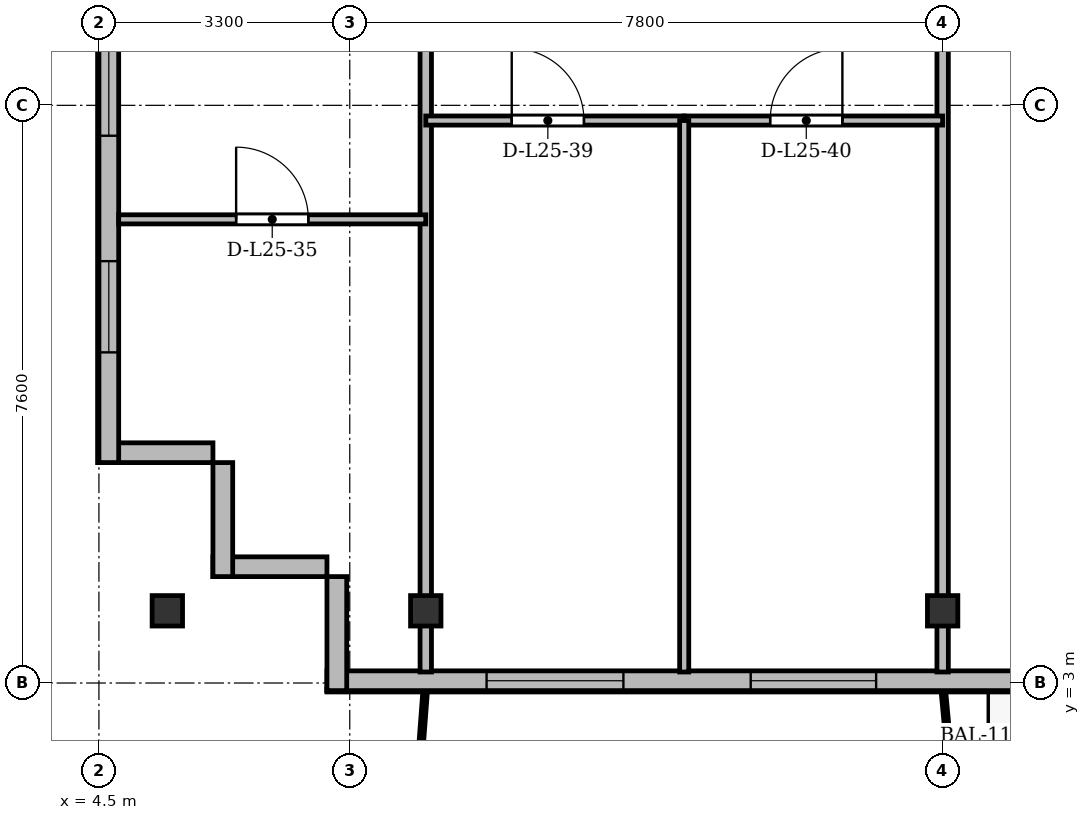
"""IFC4 building model, lengths in metres.
Left out: names, types, materials, properties, quantities, classifications, styles, units other than length and angle.
Written with IfcOpenShell. Run it as: python <this file> out.ifc"""

import sys

from ifc_helpers import new_model, si_unit, direction, frame, frame_2d, origin, origin_2d, place, context, subcontext, project, spatial, rectangle, i_section, extrude, source, transform, mapped, element, fill, save


model = new_model("IFC4")
c1 = context("Model", 3, precision=1e-05, world=origin(), true_north=direction((0.0, 1.0)))
c2 = subcontext(c1, "Body", "Model", "MODEL_VIEW")
j1 = project(units=[si_unit("LENGTHUNIT", "METRE"), si_unit("PLANEANGLEUNIT", "RADIAN")], contexts=[c1])
p1 = place(None, origin())
s1 = spatial("IfcSite", under=j1, at=p1, CompositionType="ELEMENT")
p2 = place(p1, origin())
s2 = spatial("IfcBuilding", under=s1, at=p2, CompositionType="ELEMENT")
p3 = place(p2, frame((0.0, 0.0, 99.7)))
s3 = spatial("IfcBuildingStorey", under=s2, at=p3, CompositionType="ELEMENT", Elevation=99.7)
m1 = source(origin(), c2, "Body", "SweptSolid", [
    extrude(i_section(OverallWidth=0.4, OverallDepth=0.4, WebThickness=0.022, FlangeThickness=0.035, at=origin_2d()), origin(), (0.0, 0.0, 1.0), 3.6),
])
for number, where, z_axis, x_axis in (
    (1, (5.4, 3.95, 0.0), (0.0, 0.0, 1.0), (1.0, 0.0, 0.0)),
    (2, (8.8, 3.95, 0.0), (0.0, 0.0, 1.0), (1.0, 0.0, 0.0)),
    (3, (15.6, 3.95, 0.0), (0.0, 0.0, 1.0), (1.0, 0.0, 0.0)),
):
    element("IfcColumn", number, at=place(p3, frame(where, z_axis=z_axis, x_axis=x_axis)), inside=s3, PredefinedType="COLUMN", context=c2, shape_type="MappedRepresentation", body=[
        mapped(m1, transform((0.0, 0.0, 0.0), x_axis=(1.0, 0.0, 0.0), y_axis=(0.0, 1.0, 0.0), z_axis=(0.0, 0.0, 1.0), scale=1.0)),
    ])
for number, where, z_axis, x_axis in (
    (4, (7.5, 4.53, 0.0), (0.0, 0.0, 1.0), (-1.0, 0.0, 0.0)),
    (5, (6.13, 4.4, 0.0), (0.0, 0.0, 1.0), (0.0, 1.0, 0.0)),
):
    element("IfcWall", number, at=place(p3, frame(where, z_axis=z_axis, x_axis=x_axis)), inside=s3, PredefinedType="SOLIDWALL", context=c2, shape_type="SweptSolid", body=[
        extrude(rectangle(XDim=1.5, YDim=0.26, at=frame_2d((0.75, 0.0))), origin(), (0.0, 0.0, 1.0), 3.34),
    ])
p4 = place(p3, frame((6.0, 6.03, 0.0), z_axis=(0.0, 0.0, 1.0), x_axis=(-1.0, 0.0, 0.0)))
e6 = element("IfcWall", 6, at=p4, inside=s3, PredefinedType="SOLIDWALL", context=c2, shape_type="SweptSolid", body=[
    extrude(rectangle(XDim=1.5, YDim=0.26, at=frame_2d((0.75, 0.0))), origin(), (0.0, 0.0, 1.0), 2.84),
])
p5 = place(p3, frame((4.63, 5.9, 0.0), z_axis=(0.0, 0.0, 1.0), x_axis=(0.0, 1.0, 0.0)))
e7 = element("IfcWall", 7, at=p5, inside=s3, PredefinedType="SOLIDWALL", context=c2, shape_type="SweptSolid", body=[
    extrude(rectangle(XDim=39.6, YDim=0.26, at=frame_2d((19.8, 0.0))), origin(), (0.0, 0.0, 1.0), 3.34),
])
p6 = place(p5, frame((1.45, 0.0, 0.92)))
e8 = element("IfcOpeningElement", 8, at=p6, cuts=e7, PredefinedType="OPENING", context=c2, shape_type="SweptSolid", body=[
    extrude(rectangle(XDim=1.2, YDim=1.65, at=frame_2d((0.6, 0.825))), frame((0.0, 0.14, 0.0), z_axis=(0.0, -1.0, 0.0), x_axis=(1.0, 0.0, 0.0)), (0.0, 0.0, 1.0), 0.28),
])
p7 = place(p5, frame((4.3, 0.0, 0.92)))
e9 = element("IfcOpeningElement", 9, at=p7, cuts=e7, PredefinedType="OPENING", context=c2, shape_type="SweptSolid", body=[
    extrude(rectangle(XDim=2.4, YDim=2.1, at=frame_2d((1.2, 1.05))), frame((0.0, 0.14, 0.0), z_axis=(0.0, -1.0, 0.0), x_axis=(1.0, 0.0, 0.0)), (0.0, 0.0, 1.0), 0.28),
])
p8 = place(p5, frame((8.5, 0.0, 0.92)))
e10 = element("IfcOpeningElement", 10, at=p8, cuts=e7, PredefinedType="OPENING", context=c2, shape_type="SweptSolid", body=[
    extrude(rectangle(XDim=2.4, YDim=2.1, at=frame_2d((1.2, 1.05))), frame((0.0, 0.14, 0.0), z_axis=(0.0, -1.0, 0.0), x_axis=(1.0, 0.0, 0.0)), (0.0, 0.0, 1.0), 0.28),
])
p9 = place(p5, frame((33.9, 0.0, 0.92)))
e11 = element("IfcOpeningElement", 11, at=p9, cuts=e7, PredefinedType="OPENING", context=c2, shape_type="SweptSolid", body=[
    extrude(rectangle(XDim=1.2, YDim=1.65, at=frame_2d((0.6, 0.825))), frame((0.0, 0.14, 0.0), z_axis=(0.0, -1.0, 0.0), x_axis=(1.0, 0.0, 0.0)), (0.0, 0.0, 1.0), 0.28),
])
p10 = place(p5, frame((37.25, 0.0, 0.92)))
e12 = element("IfcOpeningElement", 12, at=p10, cuts=e7, PredefinedType="OPENING", context=c2, shape_type="SweptSolid", body=[
    extrude(rectangle(XDim=1.2, YDim=1.65, at=frame_2d((0.6, 0.825))), frame((0.0, 0.14, 0.0), z_axis=(0.0, -1.0, 0.0), x_axis=(1.0, 0.0, 0.0)), (0.0, 0.0, 1.0), 0.28),
])
p11 = place(p3, frame((66.9, 3.03, 0.0), z_axis=(0.0, 0.0, 1.0), x_axis=(-1.0, 0.0, 0.0)))
e13 = element("IfcWall", 13, at=p11, inside=s3, PredefinedType="SOLIDWALL", context=c2, shape_type="SweptSolid", body=[
    extrude(rectangle(XDim=59.4, YDim=0.26, at=frame_2d((29.7, 0.0))), origin(), (0.0, 0.0, 1.0), 3.34),
])
p12 = place(p11, frame((1.9, 0.0, 0.9)))
e14 = element("IfcOpeningElement", 14, at=p12, cuts=e13, PredefinedType="OPENING", context=c2, shape_type="SweptSolid", body=[
    extrude(rectangle(XDim=2.2, YDim=1.8, at=frame_2d((1.1, 0.9))), frame((0.0, 0.14, 0.0), z_axis=(0.0, -1.0, 0.0), x_axis=(1.0, 0.0, 0.0)), (0.0, 0.0, 1.0), 0.28),
])
p13 = place(p11, frame((5.65, 0.0, 0.9)))
e15 = element("IfcOpeningElement", 15, at=p13, cuts=e13, PredefinedType="OPENING", context=c2, shape_type="SweptSolid", body=[
    extrude(rectangle(XDim=1.5, YDim=1.75, at=frame_2d((0.75, 0.875))), frame((0.0, 0.14, 0.0), z_axis=(0.0, -1.0, 0.0), x_axis=(1.0, 0.0, 0.0)), (0.0, 0.0, 1.0), 0.28),
])
p14 = place(p11, frame((8.4, 0.0, 0.9)))
e16 = element("IfcOpeningElement", 16, at=p14, cuts=e13, PredefinedType="OPENING", context=c2, shape_type="SweptSolid", body=[
    extrude(rectangle(XDim=2.0, YDim=1.95, at=frame_2d((1.0, 0.975))), frame((0.0, 0.14, 0.0), z_axis=(0.0, -1.0, 0.0), x_axis=(1.0, 0.0, 0.0)), (0.0, 0.0, 1.0), 0.28),
])
p15 = place(p11, frame((11.175, 0.0, 0.9)))
e17 = element("IfcOpeningElement", 17, at=p15, cuts=e13, PredefinedType="OPENING", context=c2, shape_type="SweptSolid", body=[
    extrude(rectangle(XDim=1.65, YDim=1.85, at=frame_2d((0.825, 0.925))), frame((0.0, 0.14, 0.0), z_axis=(0.0, -1.0, 0.0), x_axis=(1.0, 0.0, 0.0)), (0.0, 0.0, 1.0), 0.28),
])
p16 = place(p11, frame((13.7, 0.0, 0.9)))
e18 = element("IfcOpeningElement", 18, at=p16, cuts=e13, PredefinedType="OPENING", context=c2, shape_type="SweptSolid", body=[
    extrude(rectangle(XDim=1.8, YDim=1.8, at=frame_2d((0.9, 0.9))), frame((0.0, 0.14, 0.0), z_axis=(0.0, -1.0, 0.0), x_axis=(1.0, 0.0, 0.0)), (0.0, 0.0, 1.0), 0.28),
])
p17 = place(p11, frame((16.5, 0.0, 0.9)))
e19 = element("IfcOpeningElement", 19, at=p17, cuts=e13, PredefinedType="OPENING", context=c2, shape_type="SweptSolid", body=[
    extrude(rectangle(XDim=2.2, YDim=1.8, at=frame_2d((1.1, 0.9))), frame((0.0, 0.14, 0.0), z_axis=(0.0, -1.0, 0.0), x_axis=(1.0, 0.0, 0.0)), (0.0, 0.0, 1.0), 0.28),
])
p18 = place(p11, frame((20.227, 0.0, 0.0)))
e20 = element("IfcOpeningElement", 20, at=p18, cuts=e13, PredefinedType="OPENING", context=c2, shape_type="SweptSolid", body=[
    extrude(rectangle(XDim=1.2, YDim=2.2, at=frame_2d((0.6, 1.1))), frame((0.0, 0.14, 0.0), z_axis=(0.0, -1.0, 0.0), x_axis=(1.0, 0.0, 0.0)), (0.0, 0.0, 1.0), 0.28),
])
p19 = place(p11, frame((28.7, 0.0, 0.9)))
e21 = element("IfcOpeningElement", 21, at=p19, cuts=e13, PredefinedType="OPENING", context=c2, shape_type="SweptSolid", body=[
    extrude(rectangle(XDim=2.0, YDim=1.95, at=frame_2d((1.0, 0.975))), frame((0.0, 0.14, 0.0), z_axis=(0.0, -1.0, 0.0), x_axis=(1.0, 0.0, 0.0)), (0.0, 0.0, 1.0), 0.28),
])
p20 = place(p11, frame((36.675, 0.0, 0.9)))
e22 = element("IfcOpeningElement", 22, at=p20, cuts=e13, PredefinedType="OPENING", context=c2, shape_type="SweptSolid", body=[
    extrude(rectangle(XDim=1.65, YDim=1.85, at=frame_2d((0.825, 0.925))), frame((0.0, 0.14, 0.0), z_axis=(0.0, -1.0, 0.0), x_axis=(1.0, 0.0, 0.0)), (0.0, 0.0, 1.0), 0.28),
])
p21 = place(p11, frame((39.0, 0.0, 0.9)))
e23 = element("IfcOpeningElement", 23, at=p21, cuts=e13, PredefinedType="OPENING", context=c2, shape_type="SweptSolid", body=[
    extrude(rectangle(XDim=1.8, YDim=1.8, at=frame_2d((0.9, 0.9))), frame((0.0, 0.14, 0.0), z_axis=(0.0, -1.0, 0.0), x_axis=(1.0, 0.0, 0.0)), (0.0, 0.0, 1.0), 0.28),
])
p22 = place(p11, frame((41.55, 0.0, 0.9)))
e24 = element("IfcOpeningElement", 24, at=p22, cuts=e13, PredefinedType="OPENING", context=c2, shape_type="SweptSolid", body=[
    extrude(rectangle(XDim=1.5, YDim=1.75, at=frame_2d((0.75, 0.875))), frame((0.0, 0.14, 0.0), z_axis=(0.0, -1.0, 0.0), x_axis=(1.0, 0.0, 0.0)), (0.0, 0.0, 1.0), 0.28),
])
p23 = place(p11, frame((45.36, 0.0, 0.0)))
e25 = element("IfcOpeningElement", 25, at=p23, cuts=e13, PredefinedType="OPENING", context=c2, shape_type="SweptSolid", body=[
    extrude(rectangle(XDim=1.2, YDim=2.2, at=frame_2d((0.6, 1.1))), frame((0.0, 0.14, 0.0), z_axis=(0.0, -1.0, 0.0), x_axis=(1.0, 0.0, 0.0)), (0.0, 0.0, 1.0), 0.28),
])
p24 = place(p11, frame((48.3, 0.0, 0.9)))
e26 = element("IfcOpeningElement", 26, at=p24, cuts=e13, PredefinedType="OPENING", context=c2, shape_type="SweptSolid", body=[
    extrude(rectangle(XDim=2.0, YDim=1.95, at=frame_2d((1.0, 0.975))), frame((0.0, 0.14, 0.0), z_axis=(0.0, -1.0, 0.0), x_axis=(1.0, 0.0, 0.0)), (0.0, 0.0, 1.0), 0.28),
])
p25 = place(p11, frame((52.175, 0.0, 0.9)))
e27 = element("IfcOpeningElement", 27, at=p25, cuts=e13, PredefinedType="OPENING", context=c2, shape_type="SweptSolid", body=[
    extrude(rectangle(XDim=1.65, YDim=1.85, at=frame_2d((0.825, 0.925))), frame((0.0, 0.14, 0.0), z_axis=(0.0, -1.0, 0.0), x_axis=(1.0, 0.0, 0.0)), (0.0, 0.0, 1.0), 0.28),
])
p26 = place(p11, frame((55.5, 0.0, 0.9)))
e28 = element("IfcOpeningElement", 28, at=p26, cuts=e13, PredefinedType="OPENING", context=c2, shape_type="SweptSolid", body=[
    extrude(rectangle(XDim=1.8, YDim=1.8, at=frame_2d((0.9, 0.9))), frame((0.0, 0.14, 0.0), z_axis=(0.0, -1.0, 0.0), x_axis=(1.0, 0.0, 0.0)), (0.0, 0.0, 1.0), 0.28),
])
p27 = place(p3, frame((7.63, 2.9, 0.0), z_axis=(0.0, 0.0, 1.0), x_axis=(0.0, 1.0, 0.0)))
e29 = element("IfcWall", 29, at=p27, inside=s3, PredefinedType="SOLIDWALL", context=c2, shape_type="SweptSolid", body=[
    extrude(rectangle(XDim=1.5, YDim=0.26, at=frame_2d((0.75, 0.0))), origin(), (0.0, 0.0, 1.0), 2.752),
])
for number, where, z_axis, x_axis in (
    (30, (8.8, 3.145, 0.0), (0.0, 0.0, 1.0), (0.0, 1.0, 0.0)),
    (31, (15.6, 3.145, 0.0), (0.0, 0.0, 1.0), (0.0, 1.0, 0.0)),
):
    element("IfcWall", number, at=place(p3, frame(where, z_axis=z_axis, x_axis=x_axis)), inside=s3, PredefinedType="PARTITIONING", context=c2, shape_type="SweptSolid", body=[
        extrude(rectangle(XDim=24.455, YDim=0.15, at=frame_2d((12.228, 0.0))), origin(), (0.0, 0.0, 1.0), 2.84),
    ])
p28 = place(p3, frame((4.76, 9.1, 0.0), z_axis=(0.0, 0.0, 1.0), x_axis=(1.0, 0.0, 0.0)))
e32 = element("IfcWall", 32, at=p28, inside=s3, PredefinedType="PARTITIONING", context=c2, shape_type="SweptSolid", body=[
    extrude(rectangle(XDim=4.04, YDim=0.12, at=frame_2d((2.02, 0.0))), origin(), (0.0, 0.0, 1.0), 2.84),
])
p29 = place(p28, frame((1.545, 0.0, 0.0)))
e33 = element("IfcOpeningElement", 33, at=p29, cuts=e32, PredefinedType="OPENING", context=c2, shape_type="SweptSolid", body=[
    extrude(rectangle(XDim=0.95, YDim=2.15, at=frame_2d((0.475, 1.075))), frame((0.0, 0.07, 0.0), z_axis=(0.0, -1.0, 0.0), x_axis=(1.0, 0.0, 0.0)), (0.0, 0.0, 1.0), 0.14),
])
p30 = place(p3, frame((8.8, 10.4, 0.0), z_axis=(0.0, 0.0, 1.0), x_axis=(1.0, 0.0, 0.0)))
e34 = element("IfcWall", 34, at=p30, inside=s3, PredefinedType="PARTITIONING", context=c2, shape_type="SweptSolid", body=[
    extrude(rectangle(XDim=3.4, YDim=0.12, at=frame_2d((1.7, 0.0))), origin(), (0.0, 0.0, 1.0), 2.84),
])
p31 = place(p30, frame((1.131, 0.0, 0.0)))
e35 = element("IfcOpeningElement", 35, at=p31, cuts=e34, PredefinedType="OPENING", context=c2, shape_type="SweptSolid", body=[
    extrude(rectangle(XDim=0.95, YDim=2.15, at=frame_2d((0.475, 1.075))), frame((0.0, 0.07, 0.0), z_axis=(0.0, -1.0, 0.0), x_axis=(1.0, 0.0, 0.0)), (0.0, 0.0, 1.0), 0.14),
])
p32 = place(p3, frame((12.2, 10.4, 0.0), z_axis=(0.0, 0.0, 1.0), x_axis=(1.0, 0.0, 0.0)))
e36 = element("IfcWall", 36, at=p32, inside=s3, PredefinedType="PARTITIONING", context=c2, shape_type="SweptSolid", body=[
    extrude(rectangle(XDim=3.4, YDim=0.12, at=frame_2d((1.7, 0.0))), origin(), (0.0, 0.0, 1.0), 2.84),
])
p33 = place(p32, frame((1.131, 0.0, 0.0)))
e37 = element("IfcOpeningElement", 37, at=p33, cuts=e36, PredefinedType="OPENING", context=c2, shape_type="SweptSolid", body=[
    extrude(rectangle(XDim=0.95, YDim=2.15, at=frame_2d((0.475, 1.075))), frame((0.0, 0.07, 0.0), z_axis=(0.0, -1.0, 0.0), x_axis=(1.0, 0.0, 0.0)), (0.0, 0.0, 1.0), 0.14),
])
p34 = place(p3, frame((12.2, 3.145, 0.0), z_axis=(0.0, 0.0, 1.0), x_axis=(0.0, 1.0, 0.0)))
e38 = element("IfcWall", 38, at=p34, inside=s3, PredefinedType="PARTITIONING", context=c2, shape_type="SweptSolid", body=[
    extrude(rectangle(XDim=7.255, YDim=0.12, at=frame_2d((3.627, 0.0))), origin(), (0.0, 0.0, 1.0), 2.752),
])
m2 = source(origin(), c2, "Body", "SweptSolid", [
    extrude(rectangle(XDim=1.2, YDim=1.65, at=frame_2d((0.6, 0.825))), frame((0.0, 0.03, 0.0), z_axis=(0.0, -1.0, 0.0), x_axis=(1.0, 0.0, 0.0)), (0.0, 0.0, 1.0), 0.06),
])
p35 = place(p6, origin())
e39 = element("IfcWindow", 39, at=p35, inside=s3, PartitioningType="SINGLE_PANEL", PredefinedType="WINDOW", context=c2, shape_type="MappedRepresentation", body=[
    mapped(m2, transform((0.0, 0.0, 0.0), x_axis=(1.0, 0.0, 0.0), y_axis=(0.0, 1.0, 0.0), z_axis=(0.0, 0.0, 1.0), scale=1.0)),
])
fill(e8, e39)
m3 = source(origin(), c2, "Body", "SweptSolid", [
    extrude(rectangle(XDim=2.4, YDim=2.1, at=frame_2d((1.2, 1.05))), frame((0.0, 0.03, 0.0), z_axis=(0.0, -1.0, 0.0), x_axis=(1.0, 0.0, 0.0)), (0.0, 0.0, 1.0), 0.06),
])
p36 = place(p7, origin())
e40 = element("IfcWindow", 40, at=p36, inside=s3, PartitioningType="SINGLE_PANEL", PredefinedType="WINDOW", context=c2, shape_type="MappedRepresentation", body=[
    mapped(m3, transform((0.0, 0.0, 0.0), x_axis=(1.0, 0.0, 0.0), y_axis=(0.0, 1.0, 0.0), z_axis=(0.0, 0.0, 1.0), scale=1.0)),
])
fill(e9, e40)
m4 = source(origin(), c2, "Body", "SweptSolid", [
    extrude(rectangle(XDim=1.65, YDim=1.85, at=frame_2d((0.825, 0.925))), frame((0.0, 0.03, 0.0), z_axis=(0.0, -1.0, 0.0), x_axis=(1.0, 0.0, 0.0)), (0.0, 0.0, 1.0), 0.06),
])
p37 = place(p25, origin())
e41 = element("IfcWindow", 41, at=p37, inside=s3, PartitioningType="SINGLE_PANEL", PredefinedType="WINDOW", context=c2, shape_type="MappedRepresentation", body=[
    mapped(m4, transform((0.0, 0.0, 0.0), x_axis=(1.0, 0.0, 0.0), y_axis=(0.0, 1.0, 0.0), z_axis=(0.0, 0.0, 1.0), scale=1.0)),
])
fill(e27, e41)
m5 = source(origin(), c2, "Body", "SweptSolid", [
    extrude(rectangle(XDim=1.8, YDim=1.8, at=frame_2d((0.9, 0.9))), frame((0.0, 0.03, 0.0), z_axis=(0.0, -1.0, 0.0), x_axis=(1.0, 0.0, 0.0)), (0.0, 0.0, 1.0), 0.06),
])
p38 = place(p26, origin())
e42 = element("IfcWindow", 42, at=p38, inside=s3, PartitioningType="SINGLE_PANEL", PredefinedType="WINDOW", context=c2, shape_type="MappedRepresentation", body=[
    mapped(m5, transform((0.0, 0.0, 0.0), x_axis=(1.0, 0.0, 0.0), y_axis=(0.0, 1.0, 0.0), z_axis=(0.0, 0.0, 1.0), scale=1.0)),
])
fill(e28, e42)
m6 = source(origin(), c2, "Body", "SweptSolid", [
    extrude(rectangle(XDim=0.95, YDim=2.15, at=frame_2d((0.475, 1.075))), frame((0.0, 0.025, 0.0), z_axis=(0.0, -1.0, 0.0), x_axis=(1.0, 0.0, 0.0)), (0.0, 0.0, 1.0), 0.05),
])
p39 = place(p29, origin())
e43 = element("IfcDoor", 43, at=p39, inside=s3, OperationType="SINGLE_SWING_LEFT", PredefinedType="DOOR", context=c2, shape_type="MappedRepresentation", body=[
    mapped(m6, transform((0.0, 0.0, 0.0), x_axis=(1.0, 0.0, 0.0), y_axis=(0.0, 1.0, 0.0), z_axis=(0.0, 0.0, 1.0), scale=1.0)),
])
fill(e33, e43)
p40 = place(p31, origin())
e44 = element("IfcDoor", 44, at=p40, inside=s3, OperationType="SINGLE_SWING_LEFT", PredefinedType="DOOR", context=c2, shape_type="MappedRepresentation", body=[
    mapped(m6, transform((0.0, 0.0, 0.0), x_axis=(1.0, 0.0, 0.0), y_axis=(0.0, 1.0, 0.0), z_axis=(0.0, 0.0, 1.0), scale=1.0)),
])
fill(e35, e44)
p41 = place(p33, origin())
e45 = element("IfcDoor", 45, at=p41, inside=s3, OperationType="SINGLE_SWING_RIGHT", PredefinedType="DOOR", context=c2, shape_type="MappedRepresentation", body=[
    mapped(m6, transform((0.0, 0.0, 0.0), x_axis=(1.0, 0.0, 0.0), y_axis=(0.0, 1.0, 0.0), z_axis=(0.0, 0.0, 1.0), scale=1.0)),
])
fill(e37, e45)
save(model, sys.argv[1])
